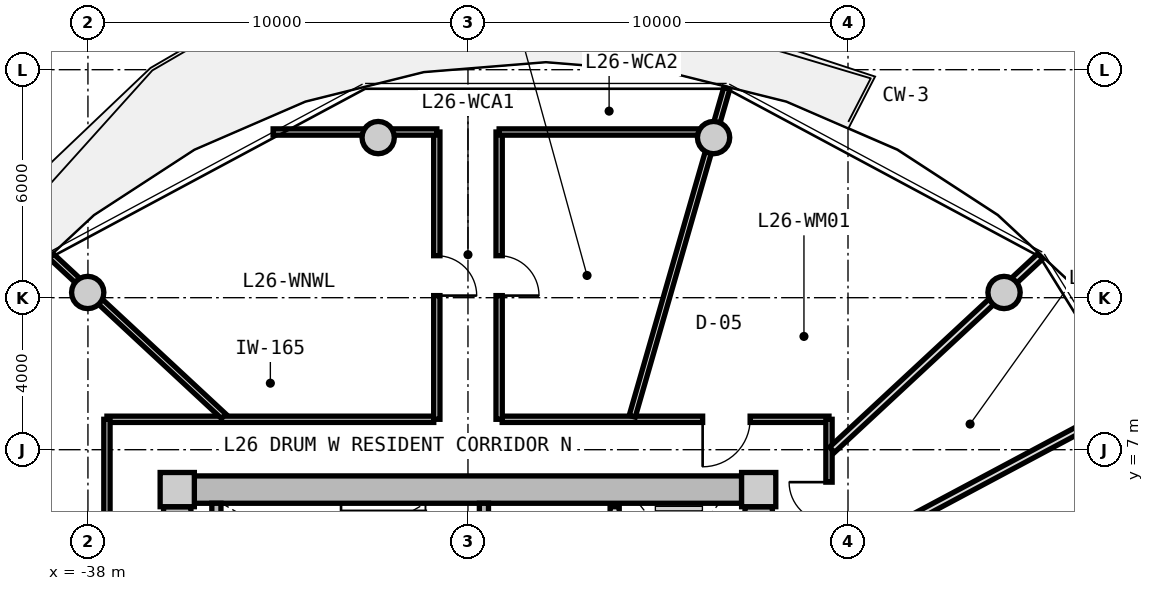
"""IFC4 building model, lengths in metres.
Left out: names, types, materials, properties, quantities, classifications, styles, units other than length and angle.
Written with IfcOpenShell. Run it as: python <this file> out.ifc"""

import sys

from ifc_helpers import new_model, si_unit, direction, frame, frame_2d, origin, origin_2d, place, context, subcontext, project, spatial, rectangle, circle, extrude, source, transform, mapped, element, fill, save


model = new_model("IFC4")
c1 = context("Model", 3, precision=1e-05, world=origin(), true_north=direction((0.0, 1.0)))
c2 = subcontext(c1, "Body", "Model", "MODEL_VIEW")
j1 = project(units=[si_unit("LENGTHUNIT", "METRE"), si_unit("PLANEANGLEUNIT", "RADIAN")], contexts=[c1])
p1 = place(None, origin())
s1 = spatial("IfcSite", under=j1, at=p1, CompositionType="ELEMENT")
p2 = place(p1, origin())
s2 = spatial("IfcBuilding", under=s1, at=p2, CompositionType="ELEMENT")
p3 = place(p2, frame((0.0, 0.0, 87.1)))
s3 = spatial("IfcBuildingStorey", under=s2, at=p3, CompositionType="ELEMENT", Elevation=87.1)
m1 = source(origin(), c2, "Body", "SweptSolid", [
    extrude(rectangle(XDim=0.9, YDim=0.9, at=origin_2d()), origin(), (0.0, 0.0, 1.0), 3.05),
])
for number, where, z_axis, x_axis in (
    (1, (-20.35, 5.95, 0.0), (0.0, 0.0, 1.0), (1.0, 0.0, 0.0)),
    (2, (-35.65, 5.95, 0.0), (0.0, 0.0, 1.0), (1.0, 0.0, 0.0)),
):
    element("IfcColumn", number, at=place(p3, frame(where, z_axis=z_axis, x_axis=x_axis)), inside=s3, PredefinedType="COLUMN", context=c2, shape_type="MappedRepresentation", body=[
        mapped(m1, transform((0.0, 0.0, 0.0), x_axis=(1.0, 0.0, 0.0), y_axis=(0.0, 1.0, 0.0), z_axis=(0.0, 0.0, 1.0), scale=1.0)),
    ])
m2 = source(origin(), c2, "Body", "SweptSolid", [
    extrude(rectangle(XDim=14.4, YDim=0.72, at=frame_2d((7.2, 0.0))), origin(), (0.0, 0.0, 1.0), 2.79),
])
p4 = place(p3, frame((-35.2, 5.95, 0.0), z_axis=(0.0, 0.0, 1.0), x_axis=(1.0, 0.0, 0.0)))
e3 = element("IfcWall", 3, at=p4, inside=s3, PredefinedType="SHEAR", context=c2, shape_type="MappedRepresentation", body=[
    mapped(m2, transform((0.0, 0.0, 0.0), x_axis=(1.0, 0.0, 0.0), y_axis=(0.0, 1.0, 0.0), z_axis=(0.0, 0.0, 1.0), scale=1.0)),
])
m3 = source(origin(), c2, "Body", "SweptSolid", [
    extrude(rectangle(XDim=11.0, YDim=0.72, at=frame_2d((5.5, 0.0))), origin(), (0.0, 0.0, 1.0), 2.79),
])
p5 = place(p3, frame((-35.65, -5.5, 0.0), z_axis=(0.0, 0.0, 1.0), x_axis=(0.0, 1.0, 0.0)))
e4 = element("IfcWall", 4, at=p5, inside=s3, PredefinedType="SHEAR", context=c2, shape_type="MappedRepresentation", body=[
    mapped(m3, transform((0.0, 0.0, 0.0), x_axis=(1.0, 0.0, 0.0), y_axis=(0.0, 1.0, 0.0), z_axis=(0.0, 0.0, 1.0), scale=1.0)),
])
p6 = place(p5, frame((3.8, 0.0, 0.0)))
e5 = element("IfcOpeningElement", 5, at=p6, cuts=e4, PredefinedType="OPENING", context=c2, shape_type="SweptSolid", body=[
    extrude(rectangle(XDim=1.2, YDim=2.15, at=frame_2d((0.6, 1.075))), frame((0.0, 0.37, 0.0), z_axis=(0.0, -1.0, 0.0), x_axis=(1.0, 0.0, 0.0)), (0.0, 0.0, 1.0), 0.74),
])
p7 = place(p3, frame((-20.35, 5.5, 0.0), z_axis=(0.0, 0.0, 1.0), x_axis=(0.0, -1.0, 0.0)))
e6 = element("IfcWall", 6, at=p7, inside=s3, PredefinedType="SHEAR", context=c2, shape_type="MappedRepresentation", body=[
    mapped(m3, transform((0.0, 0.0, 0.0), x_axis=(1.0, 0.0, 0.0), y_axis=(0.0, 1.0, 0.0), z_axis=(0.0, 0.0, 1.0), scale=1.0)),
])
p8 = place(p7, frame((5.65, 0.0, 0.0)))
e7 = element("IfcOpeningElement", 7, at=p8, cuts=e6, PredefinedType="OPENING", context=c2, shape_type="SweptSolid", body=[
    extrude(rectangle(XDim=1.2, YDim=2.15, at=frame_2d((0.6, 1.075))), frame((0.0, 0.37, 0.0), z_axis=(0.0, -1.0, 0.0), x_axis=(1.0, 0.0, 0.0)), (0.0, 0.0, 1.0), 0.74),
])
m4 = source(origin(), c2, "Body", "SweptSolid", [
    extrude(circle(Radius=0.425, at=origin_2d()), origin(), (0.0, 0.0, 1.0), 3.05),
])
for number, where, z_axis, x_axis in (
    (8, (-13.894, 11.137, 0.0), (0.0, 0.0, 1.0), (1.0, 0.0, 0.0)),
    (9, (-21.537, 15.213, 0.0), (0.0, 0.0, 1.0), (1.0, 0.0, 0.0)),
    (10, (-30.363, 15.213, 0.0), (0.0, 0.0, 1.0), (1.0, 0.0, 0.0)),
    (11, (-38.006, 11.137, 0.0), (0.0, 0.0, 1.0), (1.0, 0.0, 0.0)),
):
    element("IfcColumn", number, at=place(p3, frame(where, z_axis=z_axis, x_axis=x_axis)), inside=s3, PredefinedType="COLUMN", context=c2, shape_type="MappedRepresentation", body=[
        mapped(m4, transform((0.0, 0.0, 0.0), x_axis=(1.0, 0.0, 0.0), y_axis=(0.0, 1.0, 0.0), z_axis=(0.0, 0.0, 1.0), scale=1.0)),
    ])
m5 = source(origin(), c2, "Body", "SweptSolid", [
    extrude(rectangle(XDim=3.14, YDim=0.24, at=frame_2d((1.57, 0.0))), origin(), (0.0, 0.0, 1.0), 2.79),
])
p9 = place(p3, frame((-34.62, 2.45, 0.0), z_axis=(0.0, 0.0, 1.0), x_axis=(0.0, 1.0, 0.0)))
e12 = element("IfcWall", 12, at=p9, inside=s3, PredefinedType="PARTITIONING", context=c2, shape_type="MappedRepresentation", body=[
    mapped(m5, transform((0.0, 0.0, 0.0), x_axis=(1.0, 0.0, 0.0), y_axis=(0.0, 1.0, 0.0), z_axis=(0.0, 0.0, 1.0), scale=1.0)),
])
p10 = place(p3, frame((-27.58, 2.45, 0.0), z_axis=(0.0, 0.0, 1.0), x_axis=(0.0, 1.0, 0.0)))
e13 = element("IfcWall", 13, at=p10, inside=s3, PredefinedType="PARTITIONING", context=c2, shape_type="MappedRepresentation", body=[
    mapped(m5, transform((0.0, 0.0, 0.0), x_axis=(1.0, 0.0, 0.0), y_axis=(0.0, 1.0, 0.0), z_axis=(0.0, 0.0, 1.0), scale=1.0)),
])
p11 = place(p10, frame((0.55, 0.0, 0.0)))
e14 = element("IfcOpeningElement", 14, at=p11, cuts=e13, PredefinedType="OPENING", context=c2, shape_type="SweptSolid", body=[
    extrude(rectangle(XDim=1.1, YDim=2.15, at=frame_2d((0.55, 1.075))), frame((0.0, 0.13, 0.0), z_axis=(0.0, -1.0, 0.0), x_axis=(1.0, 0.0, 0.0)), (0.0, 0.0, 1.0), 0.26),
])
m6 = source(origin(), c2, "Body", "SweptSolid", [
    extrude(rectangle(XDim=5.0, YDim=0.24, at=frame_2d((2.5, 0.0))), origin(), (0.0, 0.0, 1.0), 2.775),
])
p12 = place(p3, frame((-24.14, 0.5, 0.0), z_axis=(0.0, 0.0, 1.0), x_axis=(0.0, 1.0, 0.0)))
e15 = element("IfcWall", 15, at=p12, inside=s3, PredefinedType="PARTITIONING", context=c2, shape_type="MappedRepresentation", body=[
    mapped(m6, transform((0.0, 0.0, 0.0), x_axis=(1.0, 0.0, 0.0), y_axis=(0.0, 1.0, 0.0), z_axis=(0.0, 0.0, 1.0), scale=1.0)),
])
p13 = place(p12, frame((3.05, 0.0, 0.0)))
e16 = element("IfcOpeningElement", 16, at=p13, cuts=e15, PredefinedType="OPENING", context=c2, shape_type="SweptSolid", body=[
    extrude(rectangle(XDim=1.3, YDim=2.2, at=frame_2d((0.65, 1.1))), frame((0.0, 0.13, 0.0), z_axis=(0.0, -1.0, 0.0), x_axis=(1.0, 0.0, 0.0)), (0.0, 0.0, 1.0), 0.26),
])
p14 = place(p12, frame((0.55, 0.0, 0.0)))
e17 = element("IfcOpeningElement", 17, at=p14, cuts=e15, PredefinedType="OPENING", context=c2, shape_type="SweptSolid", body=[
    extrude(rectangle(XDim=1.3, YDim=2.2, at=frame_2d((0.65, 1.1))), frame((0.0, 0.13, 0.0), z_axis=(0.0, -1.0, 0.0), x_axis=(1.0, 0.0, 0.0)), (0.0, 0.0, 1.0), 0.26),
])
m7 = source(origin(), c2, "Body", "SweptSolid", [
    extrude(rectangle(XDim=8.6, YDim=0.165, at=frame_2d((4.3, 0.0))), origin(), (0.0, 0.0, 1.0), 2.775),
])
p15 = place(p3, frame((-37.5, 7.8, 0.0), z_axis=(0.0, 0.0, 1.0), x_axis=(1.0, 0.0, 0.0)))
e18 = element("IfcWall", 18, at=p15, inside=s3, PredefinedType="PARTITIONING", context=c2, shape_type="MappedRepresentation", body=[
    mapped(m7, transform((0.0, 0.0, 0.0), x_axis=(1.0, 0.0, 0.0), y_axis=(0.0, 1.0, 0.0), z_axis=(0.0, 0.0, 1.0), scale=1.0)),
])
p16 = place(p3, frame((-27.1, 7.8, 0.0), z_axis=(0.0, 0.0, 1.0), x_axis=(1.0, 0.0, 0.0)))
e19 = element("IfcWall", 19, at=p16, inside=s3, PredefinedType="PARTITIONING", context=c2, shape_type="MappedRepresentation", body=[
    mapped(m7, transform((0.0, 0.0, 0.0), x_axis=(1.0, 0.0, 0.0), y_axis=(0.0, 1.0, 0.0), z_axis=(0.0, 0.0, 1.0), scale=1.0)),
])
p17 = place(p16, frame((5.275, 0.0, 0.0)))
e20 = element("IfcOpeningElement", 20, at=p17, cuts=e19, PredefinedType="OPENING", context=c2, shape_type="SweptSolid", body=[
    extrude(rectangle(XDim=1.25, YDim=2.2, at=frame_2d((0.625, 1.1))), frame((0.0, 0.093, 0.0), z_axis=(0.0, -1.0, 0.0), x_axis=(1.0, 0.0, 0.0)), (0.0, 0.0, 1.0), 0.185),
])
m8 = source(origin(), c2, "Body", "SweptSolid", [
    extrude(rectangle(XDim=15.6, YDim=0.165, at=frame_2d((7.8, 0.0))), origin(), (0.0, 0.0, 1.0), 2.775),
])
p18 = place(p3, frame((-37.5, -7.8, 0.0), z_axis=(0.0, 0.0, 1.0), x_axis=(0.0, 1.0, 0.0)))
e21 = element("IfcWall", 21, at=p18, inside=s3, PredefinedType="PARTITIONING", context=c2, shape_type="MappedRepresentation", body=[
    mapped(m8, transform((0.0, 0.0, 0.0), x_axis=(1.0, 0.0, 0.0), y_axis=(0.0, 1.0, 0.0), z_axis=(0.0, 0.0, 1.0), scale=1.0)),
])
p19 = place(p18, frame((7.175, 0.0, 0.0)))
e22 = element("IfcOpeningElement", 22, at=p19, cuts=e21, PredefinedType="OPENING", context=c2, shape_type="SweptSolid", body=[
    extrude(rectangle(XDim=1.25, YDim=2.2, at=frame_2d((0.625, 1.1))), frame((0.0, 0.093, 0.0), z_axis=(0.0, -1.0, 0.0), x_axis=(1.0, 0.0, 0.0)), (0.0, 0.0, 1.0), 0.185),
])
p20 = place(p3, frame((-18.5, 7.8, 0.0), z_axis=(0.0, 0.0, 1.0), x_axis=(0.0, -1.0, 0.0)))
e23 = element("IfcWall", 23, at=p20, inside=s3, PredefinedType="PARTITIONING", context=c2, shape_type="MappedRepresentation", body=[
    mapped(m8, transform((0.0, 0.0, 0.0), x_axis=(1.0, 0.0, 0.0), y_axis=(0.0, 1.0, 0.0), z_axis=(0.0, 0.0, 1.0), scale=1.0)),
])
p21 = place(p20, frame((12.002, 0.0, 0.0)))
e24 = element("IfcOpeningElement", 24, at=p21, cuts=e23, PredefinedType="OPENING", context=c2, shape_type="SweptSolid", body=[
    extrude(rectangle(XDim=1.05, YDim=2.15, at=frame_2d((0.525, 1.075))), frame((0.0, 0.093, 0.0), z_axis=(0.0, -1.0, 0.0), x_axis=(1.0, 0.0, 0.0)), (0.0, 0.0, 1.0), 0.185),
])
p22 = place(p20, frame((10.211, 0.0, 0.0)))
e25 = element("IfcOpeningElement", 25, at=p22, cuts=e23, PredefinedType="OPENING", context=c2, shape_type="SweptSolid", body=[
    extrude(rectangle(XDim=1.05, YDim=2.15, at=frame_2d((0.525, 1.075))), frame((0.0, 0.093, 0.0), z_axis=(0.0, -1.0, 0.0), x_axis=(1.0, 0.0, 0.0)), (0.0, 0.0, 1.0), 0.185),
])
p23 = place(p20, frame((7.722, 0.0, 0.0)))
e26 = element("IfcOpeningElement", 26, at=p23, cuts=e23, PredefinedType="OPENING", context=c2, shape_type="SweptSolid", body=[
    extrude(rectangle(XDim=1.05, YDim=2.15, at=frame_2d((0.525, 1.075))), frame((0.0, 0.093, 0.0), z_axis=(0.0, -1.0, 0.0), x_axis=(1.0, 0.0, 0.0)), (0.0, 0.0, 1.0), 0.185),
])
p24 = place(p20, frame((6.291, 0.0, 0.0)))
e27 = element("IfcOpeningElement", 27, at=p24, cuts=e23, PredefinedType="OPENING", context=c2, shape_type="SweptSolid", body=[
    extrude(rectangle(XDim=1.05, YDim=2.15, at=frame_2d((0.525, 1.075))), frame((0.0, 0.093, 0.0), z_axis=(0.0, -1.0, 0.0), x_axis=(1.0, 0.0, 0.0)), (0.0, 0.0, 1.0), 0.185),
])
p25 = place(p20, frame((4.296, 0.0, 0.0)))
e28 = element("IfcOpeningElement", 28, at=p25, cuts=e23, PredefinedType="OPENING", context=c2, shape_type="SweptSolid", body=[
    extrude(rectangle(XDim=1.05, YDim=2.15, at=frame_2d((0.525, 1.075))), frame((0.0, 0.093, 0.0), z_axis=(0.0, -1.0, 0.0), x_axis=(1.0, 0.0, 0.0)), (0.0, 0.0, 1.0), 0.185),
])
p26 = place(p20, frame((1.654, 0.0, 0.0)))
e29 = element("IfcOpeningElement", 29, at=p26, cuts=e23, PredefinedType="OPENING", context=c2, shape_type="SweptSolid", body=[
    extrude(rectangle(XDim=1.05, YDim=2.15, at=frame_2d((0.525, 1.075))), frame((0.0, 0.093, 0.0), z_axis=(0.0, -1.0, 0.0), x_axis=(1.0, 0.0, 0.0)), (0.0, 0.0, 1.0), 0.185),
])
m9 = source(origin(), c2, "Body", "SweptSolid", [
    extrude(rectangle(XDim=8.989, YDim=0.165, at=frame_2d((4.495, 0.0))), origin(), (0.0, 0.0, 1.0), 2.275),
])
p27 = place(p3, frame((-23.678, 7.88, 0.0), z_axis=(0.0, 0.0, 1.0), x_axis=(0.27702323008, 0.960863221274, 0.0)))
e30 = element("IfcWall", 30, at=p27, inside=s3, PredefinedType="PARTITIONING", context=c2, shape_type="MappedRepresentation", body=[
    mapped(m9, transform((0.0, 0.0, 0.0), x_axis=(1.0, 0.0, 0.0), y_axis=(0.0, 1.0, 0.0), z_axis=(0.0, 0.0, 1.0), scale=1.0)),
])
m10 = source(origin(), c2, "Body", "SweptSolid", [
    extrude(rectangle(XDim=6.187, YDim=0.165, at=frame_2d((3.093, 0.0))), origin(), (0.0, 0.0, 1.0), 2.275),
])
p28 = place(p3, frame((-34.429, 7.88, 0.0), z_axis=(0.0, 0.0, 1.0), x_axis=(-0.732501077882, 0.680765870841, 0.0)))
e31 = element("IfcWall", 31, at=p28, inside=s3, PredefinedType="PARTITIONING", context=c2, shape_type="MappedRepresentation", body=[
    mapped(m10, transform((0.0, 0.0, 0.0), x_axis=(1.0, 0.0, 0.0), y_axis=(0.0, 1.0, 0.0), z_axis=(0.0, 0.0, 1.0), scale=1.0)),
])
m11 = source(origin(), c2, "Body", "SweptSolid", [
    extrude(rectangle(XDim=7.56, YDim=0.165, at=frame_2d((3.78, 0.0))), origin(), (0.0, 0.0, 1.0), 2.775),
])
p29 = place(p3, frame((-28.82, 7.8, 0.0), z_axis=(0.0, 0.0, 1.0), x_axis=(0.0, 1.0, 0.0)))
e32 = element("IfcWall", 32, at=p29, inside=s3, PredefinedType="PARTITIONING", context=c2, shape_type="MappedRepresentation", body=[
    mapped(m11, transform((0.0, 0.0, 0.0), x_axis=(1.0, 0.0, 0.0), y_axis=(0.0, 1.0, 0.0), z_axis=(0.0, 0.0, 1.0), scale=1.0)),
])
p30 = place(p29, frame((3.255, 0.0, 0.0)))
e33 = element("IfcOpeningElement", 33, at=p30, cuts=e32, PredefinedType="OPENING", context=c2, shape_type="SweptSolid", body=[
    extrude(rectangle(XDim=1.05, YDim=2.15, at=frame_2d((0.525, 1.075))), frame((0.0, 0.093, 0.0), z_axis=(0.0, -1.0, 0.0), x_axis=(1.0, 0.0, 0.0)), (0.0, 0.0, 1.0), 0.185),
])
m12 = source(origin(), c2, "Body", "SweptSolid", [
    extrude(rectangle(XDim=4.307, YDim=0.165, at=frame_2d((2.153, 0.0))), origin(), (0.0, 0.0, 1.0), 2.275),
])
p31 = place(p3, frame((-33.127, 15.36, 0.0), z_axis=(0.0, 0.0, 1.0), x_axis=(1.0, 0.0, 0.0)))
e34 = element("IfcWall", 34, at=p31, inside=s3, PredefinedType="PARTITIONING", context=c2, shape_type="MappedRepresentation", body=[
    mapped(m12, transform((0.0, 0.0, 0.0), x_axis=(1.0, 0.0, 0.0), y_axis=(0.0, 1.0, 0.0), z_axis=(0.0, 0.0, 1.0), scale=1.0)),
])
p32 = place(p3, frame((-27.18, 7.8, 0.0), z_axis=(0.0, 0.0, 1.0), x_axis=(0.0, 1.0, 0.0)))
e35 = element("IfcWall", 35, at=p32, inside=s3, PredefinedType="PARTITIONING", context=c2, shape_type="MappedRepresentation", body=[
    mapped(m11, transform((0.0, 0.0, 0.0), x_axis=(1.0, 0.0, 0.0), y_axis=(0.0, 1.0, 0.0), z_axis=(0.0, 0.0, 1.0), scale=1.0)),
])
p33 = place(p32, frame((3.255, 0.0, 0.0)))
e36 = element("IfcOpeningElement", 36, at=p33, cuts=e35, PredefinedType="OPENING", context=c2, shape_type="SweptSolid", body=[
    extrude(rectangle(XDim=1.05, YDim=2.15, at=frame_2d((0.525, 1.075))), frame((0.0, 0.093, 0.0), z_axis=(0.0, -1.0, 0.0), x_axis=(1.0, 0.0, 0.0)), (0.0, 0.0, 1.0), 0.185),
])
m13 = source(origin(), c2, "Body", "SweptSolid", [
    extrude(rectangle(XDim=5.814, YDim=0.165, at=frame_2d((2.907, 0.0))), origin(), (0.0, 0.0, 1.0), 2.275),
])
p34 = place(p3, frame((-27.18, 15.36, 0.0), z_axis=(0.0, 0.0, 1.0), x_axis=(1.0, 0.0, 0.0)))
e37 = element("IfcWall", 37, at=p34, inside=s3, PredefinedType="PARTITIONING", context=c2, shape_type="MappedRepresentation", body=[
    mapped(m13, transform((0.0, 0.0, 0.0), x_axis=(1.0, 0.0, 0.0), y_axis=(0.0, 1.0, 0.0), z_axis=(0.0, 0.0, 1.0), scale=1.0)),
])
m14 = source(origin(), c2, "Body", "SweptSolid", [
    extrude(rectangle(XDim=7.482, YDim=0.19, at=frame_2d((3.741, 0.0))), origin(), (0.0, 0.0, 1.0), 2.275),
])
p35 = place(p3, frame((-18.42, 6.998, 0.0), z_axis=(0.0, 0.0, 1.0), x_axis=(0.732508698043, 0.680757671489, 0.0)))
e38 = element("IfcWall", 38, at=p35, inside=s3, PredefinedType="PARTITIONING", context=c2, shape_type="MappedRepresentation", body=[
    mapped(m14, transform((0.0, 0.0, 0.0), x_axis=(1.0, 0.0, 0.0), y_axis=(0.0, 1.0, 0.0), z_axis=(0.0, 0.0, 1.0), scale=1.0)),
])
m15 = source(origin(), c2, "Body", "SweptSolid", [
    extrude(rectangle(XDim=8.968, YDim=0.19, at=frame_2d((4.484, 0.0))), origin(), (0.0, 0.0, 1.0), 2.775),
])
p36 = place(p3, frame((-18.47, 4.036, 0.0), z_axis=(0.0, 0.0, 1.0), x_axis=(0.882202936563, 0.47086938605, 0.0)))
e39 = element("IfcWall", 39, at=p36, inside=s3, PredefinedType="PARTITIONING", context=c2, shape_type="MappedRepresentation", body=[
    mapped(m15, transform((0.0, 0.0, 0.0), x_axis=(1.0, 0.0, 0.0), y_axis=(0.0, 1.0, 0.0), z_axis=(0.0, 0.0, 1.0), scale=1.0)),
])
m16 = source(origin(), c2, "Body", "SweptSolid", [
    extrude(rectangle(XDim=1.05, YDim=2.15, at=frame_2d((0.525, 1.075))), frame((0.0, 0.025, 0.0), z_axis=(0.0, -1.0, 0.0), x_axis=(1.0, 0.0, 0.0)), (0.0, 0.0, 1.0), 0.05),
])
p37 = place(p30, frame((1.05, 0.0, 0.0), z_axis=(0.0, 0.0, 1.0), x_axis=(-1.0, 0.0, 0.0)))
e40 = element("IfcDoor", 40, at=p37, inside=s3, OperationType="SINGLE_SWING_RIGHT", PredefinedType="DOOR", context=c2, shape_type="MappedRepresentation", body=[
    mapped(m16, transform((0.0, 0.0, 0.0), x_axis=(1.0, 0.0, 0.0), y_axis=(0.0, 1.0, 0.0), z_axis=(0.0, 0.0, 1.0), scale=1.0)),
])
fill(e33, e40)
p38 = place(p33, frame((1.05, 0.0, 0.0), z_axis=(0.0, 0.0, 1.0), x_axis=(-1.0, 0.0, 0.0)))
e41 = element("IfcDoor", 41, at=p38, inside=s3, OperationType="SINGLE_SWING_RIGHT", PredefinedType="DOOR", context=c2, shape_type="MappedRepresentation", body=[
    mapped(m16, transform((0.0, 0.0, 0.0), x_axis=(1.0, 0.0, 0.0), y_axis=(0.0, 1.0, 0.0), z_axis=(0.0, 0.0, 1.0), scale=1.0)),
])
fill(e36, e41)
p39 = place(p26, frame((1.05, 0.0, 0.0), z_axis=(0.0, 0.0, 1.0), x_axis=(-1.0, 0.0, 0.0)))
e42 = element("IfcDoor", 42, at=p39, inside=s3, OperationType="SINGLE_SWING_RIGHT", PredefinedType="DOOR", context=c2, shape_type="MappedRepresentation", body=[
    mapped(m16, transform((0.0, 0.0, 0.0), x_axis=(1.0, 0.0, 0.0), y_axis=(0.0, 1.0, 0.0), z_axis=(0.0, 0.0, 1.0), scale=1.0)),
])
fill(e29, e42)
m17 = source(origin(), c2, "Body", "SweptSolid", [
    extrude(rectangle(XDim=1.25, YDim=2.2, at=frame_2d((0.625, 1.1))), frame((0.0, 0.025, 0.0), z_axis=(0.0, -1.0, 0.0), x_axis=(1.0, 0.0, 0.0)), (0.0, 0.0, 1.0), 0.05),
])
p40 = place(p17, frame((1.25, 0.0, 0.0), z_axis=(0.0, 0.0, 1.0), x_axis=(-1.0, 0.0, 0.0)))
e43 = element("IfcDoor", 43, at=p40, inside=s3, OperationType="SINGLE_SWING_RIGHT", PredefinedType="DOOR", context=c2, shape_type="MappedRepresentation", body=[
    mapped(m17, transform((0.0, 0.0, 0.0), x_axis=(1.0, 0.0, 0.0), y_axis=(0.0, 1.0, 0.0), z_axis=(0.0, 0.0, 1.0), scale=1.0)),
])
fill(e20, e43)
save(model, sys.argv[1])
